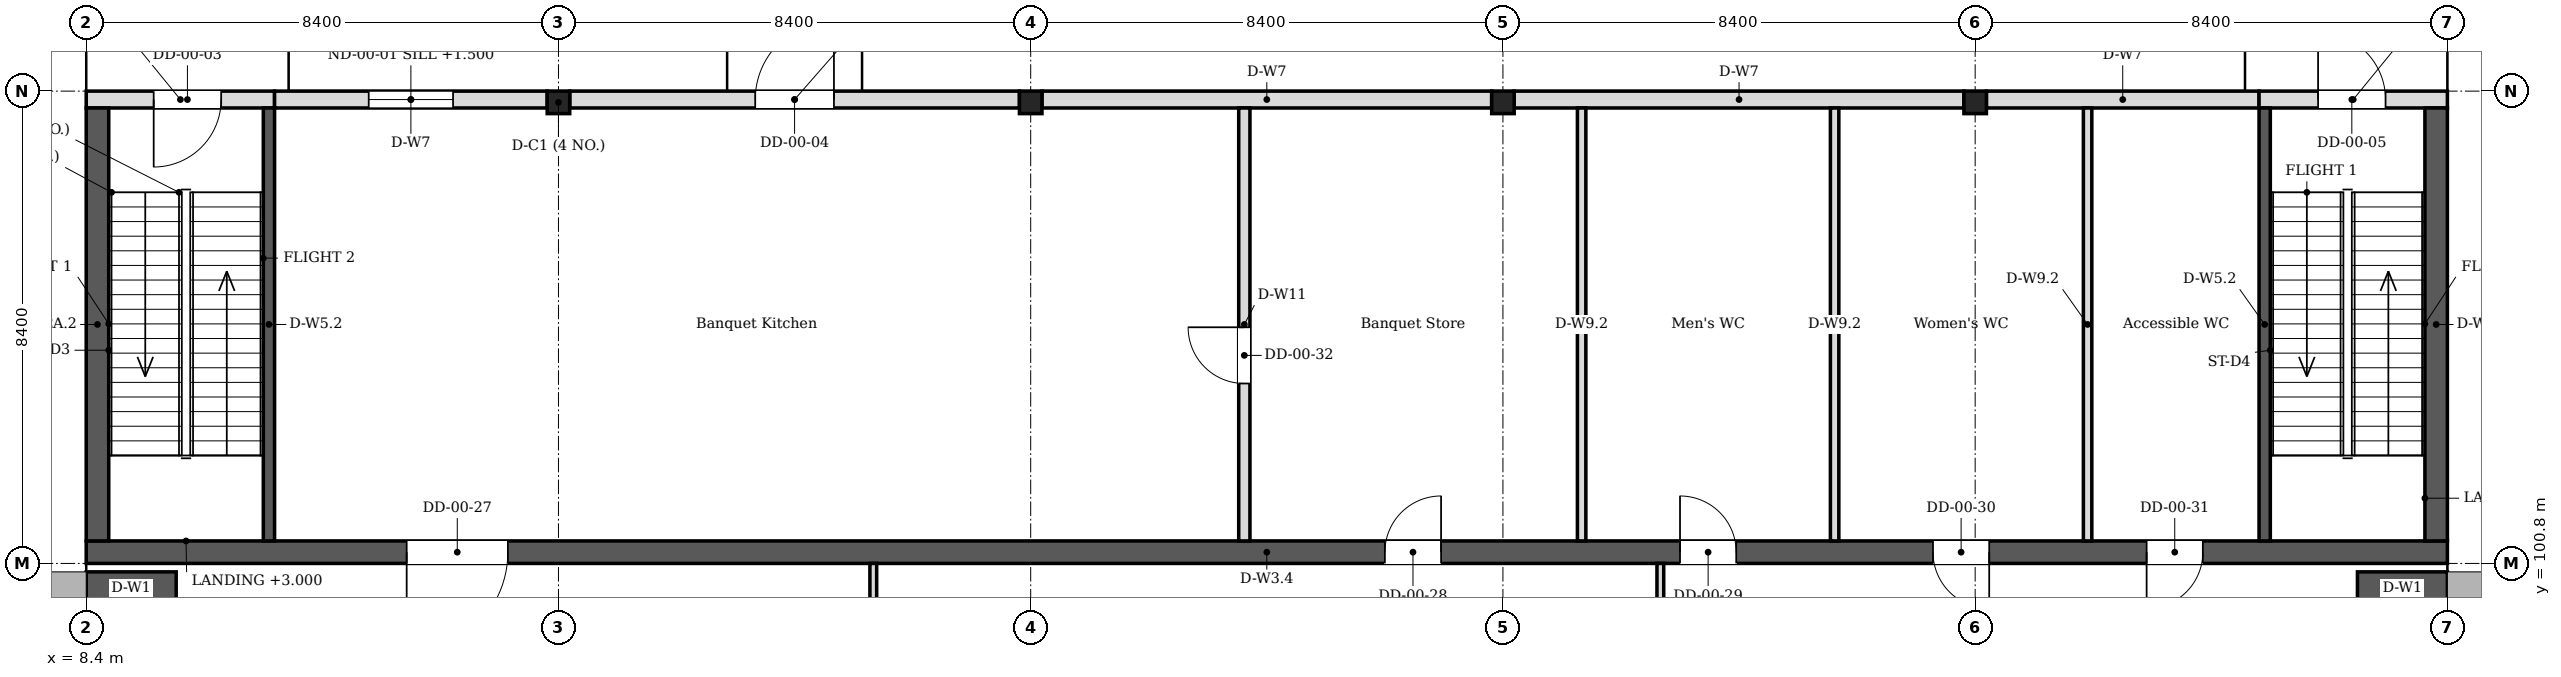
"""IFC4 building model, lengths in metres.
Left out: names, types, materials, properties, quantities, classifications, styles, units other than length and angle.
Written with IfcOpenShell. Run it as: python <this file> out.ifc"""

import sys

from ifc_helpers import new_model, si_unit, direction, frame, frame_2d, origin, origin_2d, place, context, subcontext, project, spatial, rectangle, i_section, extrude, element, fill, save


model = new_model("IFC4")
c1 = context("Model", 3, precision=1e-05, world=origin(), true_north=direction((0.0, 1.0)))
c2 = subcontext(c1, "Body", "Model", "MODEL_VIEW")
j1 = project(units=[si_unit("LENGTHUNIT", "METRE"), si_unit("PLANEANGLEUNIT", "RADIAN")], contexts=[c1])
p1 = place(None, origin())
s1 = spatial("IfcSite", under=j1, at=p1, CompositionType="ELEMENT")
p2 = place(p1, origin())
s2 = spatial("IfcBuilding", under=s1, at=p2, CompositionType="ELEMENT")
p3 = place(p2, origin())
s3 = spatial("IfcBuildingStorey", under=s2, at=p3, CompositionType="ELEMENT", Elevation=0.0)
p4 = place(p3, frame((8.4, 100.35, 0.0), z_axis=(0.0, 0.0, 1.0), x_axis=(1.0, 0.0, 0.0)))
e1 = element("IfcWall", 1, at=p4, inside=s3, PredefinedType="SOLIDWALL", context=c2, shape_type="SweptSolid", body=[
    extrude(rectangle(XDim=1.6, YDim=0.6, at=frame_2d((0.8, 0.0))), origin(), (0.0, 0.0, 1.0), 14.467),
])
p5 = place(p3, frame((50.4, 100.35, 0.0), z_axis=(0.0, 0.0, 1.0), x_axis=(-1.0, 0.0, 0.0)))
e2 = element("IfcWall", 2, at=p5, inside=s3, PredefinedType="SOLIDWALL", context=c2, shape_type="SweptSolid", body=[
    extrude(rectangle(XDim=1.6, YDim=0.6, at=frame_2d((0.8, 0.0))), origin(), (0.0, 0.0, 1.0), 14.467),
])
p6 = place(p3, frame((8.4, 101.0, 0.0), z_axis=(0.0, 0.0, 1.0), x_axis=(1.0, 0.0, 0.0)))
e3 = element("IfcWall", 3, at=p6, inside=s3, PredefinedType="SOLIDWALL", context=c2, shape_type="SweptSolid", body=[
    extrude(rectangle(XDim=42.0, YDim=0.4, at=frame_2d((21.0, 0.0))), origin(), (0.0, 0.0, 1.0), 5.72),
])
p7 = place(p6, frame((5.7, 0.0, 0.0)))
e4 = element("IfcOpeningElement", 4, at=p7, cuts=e3, PredefinedType="OPENING", context=c2, shape_type="SweptSolid", body=[
    extrude(rectangle(XDim=1.8, YDim=2.1, at=frame_2d((0.9, 1.05))), frame((0.0, 0.21, 0.0), z_axis=(0.0, -1.0, 0.0), x_axis=(1.0, 0.0, 0.0)), (0.0, 0.0, 1.0), 0.42),
])
p8 = place(p6, frame((23.1, 0.0, 0.0)))
e5 = element("IfcOpeningElement", 5, at=p8, cuts=e3, PredefinedType="OPENING", context=c2, shape_type="SweptSolid", body=[
    extrude(rectangle(XDim=1.0, YDim=2.1, at=frame_2d((0.5, 1.05))), frame((0.0, 0.21, 0.0), z_axis=(0.0, -1.0, 0.0), x_axis=(1.0, 0.0, 0.0)), (0.0, 0.0, 1.0), 0.42),
])
p9 = place(p6, frame((28.35, 0.0, 0.0)))
e6 = element("IfcOpeningElement", 6, at=p9, cuts=e3, PredefinedType="OPENING", context=c2, shape_type="SweptSolid", body=[
    extrude(rectangle(XDim=1.0, YDim=2.1, at=frame_2d((0.5, 1.05))), frame((0.0, 0.21, 0.0), z_axis=(0.0, -1.0, 0.0), x_axis=(1.0, 0.0, 0.0)), (0.0, 0.0, 1.0), 0.42),
])
p10 = place(p6, frame((32.85, 0.0, 0.0)))
e7 = element("IfcOpeningElement", 7, at=p10, cuts=e3, PredefinedType="OPENING", context=c2, shape_type="SweptSolid", body=[
    extrude(rectangle(XDim=1.0, YDim=2.1, at=frame_2d((0.5, 1.05))), frame((0.0, 0.21, 0.0), z_axis=(0.0, -1.0, 0.0), x_axis=(1.0, 0.0, 0.0)), (0.0, 0.0, 1.0), 0.42),
])
p11 = place(p6, frame((36.65, 0.0, 0.0)))
e8 = element("IfcOpeningElement", 8, at=p11, cuts=e3, PredefinedType="OPENING", context=c2, shape_type="SweptSolid", body=[
    extrude(rectangle(XDim=1.0, YDim=2.1, at=frame_2d((0.5, 1.05))), frame((0.0, 0.21, 0.0), z_axis=(0.0, -1.0, 0.0), x_axis=(1.0, 0.0, 0.0)), (0.0, 0.0, 1.0), 0.42),
])
p12 = place(p3, frame((8.6, 101.2, 0.0), z_axis=(0.0, 0.0, 1.0), x_axis=(0.0, 1.0, 0.0)))
e9 = element("IfcWall", 9, at=p12, inside=s3, PredefinedType="SOLIDWALL", context=c2, shape_type="SweptSolid", body=[
    extrude(rectangle(XDim=7.7, YDim=0.4, at=frame_2d((3.85, 0.0))), origin(), (0.0, 0.0, 1.0), 5.72),
])
p13 = place(p3, frame((11.65, 101.2, 0.0), z_axis=(0.0, 0.0, 1.0), x_axis=(0.0, 1.0, 0.0)))
e10 = element("IfcWall", 10, at=p13, inside=s3, PredefinedType="SOLIDWALL", context=c2, shape_type="SweptSolid", body=[
    extrude(rectangle(XDim=7.7, YDim=0.2, at=frame_2d((3.85, 0.0))), origin(), (0.0, 0.0, 1.0), 5.72),
])
p14 = place(p3, frame((50.2, 101.2, 0.0), z_axis=(0.0, 0.0, 1.0), x_axis=(0.0, 1.0, 0.0)))
e11 = element("IfcWall", 11, at=p14, inside=s3, PredefinedType="SOLIDWALL", context=c2, shape_type="SweptSolid", body=[
    extrude(rectangle(XDim=7.7, YDim=0.4, at=frame_2d((3.85, 0.0))), origin(), (0.0, 0.0, 1.0), 5.72),
])
p15 = place(p3, frame((47.15, 101.2, 0.0), z_axis=(0.0, 0.0, 1.0), x_axis=(0.0, 1.0, 0.0)))
e12 = element("IfcWall", 12, at=p15, inside=s3, PredefinedType="SOLIDWALL", context=c2, shape_type="SweptSolid", body=[
    extrude(rectangle(XDim=7.7, YDim=0.2, at=frame_2d((3.85, 0.0))), origin(), (0.0, 0.0, 1.0), 5.72),
])
for number, where, z_axis, x_axis in (
    (13, (16.8, 109.0, 0.0), (0.0, 0.0, 1.0), (1.0, 0.0, 0.0)),
    (14, (25.2, 109.0, 0.0), (0.0, 0.0, 1.0), (1.0, 0.0, 0.0)),
    (15, (33.6, 109.0, 0.0), (0.0, 0.0, 1.0), (1.0, 0.0, 0.0)),
    (16, (42.0, 109.0, 0.0), (0.0, 0.0, 1.0), (1.0, 0.0, 0.0)),
):
    element("IfcColumn", number, at=place(p3, frame(where, z_axis=z_axis, x_axis=x_axis)), inside=s3, PredefinedType="COLUMN", context=c2, shape_type="SweptSolid", body=[
        extrude(i_section(OverallWidth=0.4, OverallDepth=0.4, WebThickness=0.013, FlangeThickness=0.021, FilletRadius=0.022, at=origin_2d()), origin(), (0.0, 0.0, 1.0), 6.0),
    ])
p16 = place(p3, frame((8.4, 109.05, 0.0), z_axis=(0.0, 0.0, 1.0), x_axis=(1.0, 0.0, 0.0)))
e17 = element("IfcWall", 17, at=p16, inside=s3, PredefinedType="SOLIDWALL", context=c2, shape_type="SweptSolid", body=[
    extrude(rectangle(XDim=3.35, YDim=0.3, at=frame_2d((1.675, 0.0))), origin(), (0.0, 0.0, 1.0), 5.72),
])
p17 = place(p16, frame((1.2, 0.0, 0.0)))
e18 = element("IfcOpeningElement", 18, at=p17, cuts=e17, PredefinedType="OPENING", context=c2, shape_type="SweptSolid", body=[
    extrude(rectangle(XDim=1.2, YDim=2.1, at=frame_2d((0.6, 1.05))), frame((0.0, 0.16, 0.0), z_axis=(0.0, -1.0, 0.0), x_axis=(1.0, 0.0, 0.0)), (0.0, 0.0, 1.0), 0.32),
])
p18 = place(p3, frame((11.75, 109.05, 0.0), z_axis=(0.0, 0.0, 1.0), x_axis=(1.0, 0.0, 0.0)))
e19 = element("IfcWall", 19, at=p18, inside=s3, PredefinedType="SOLIDWALL", context=c2, shape_type="SweptSolid", body=[
    extrude(rectangle(XDim=4.85, YDim=0.3, at=frame_2d((2.425, 0.0))), origin(), (0.0, 0.0, 1.0), 5.22),
])
p19 = place(p18, frame((1.675, 0.0, 1.5)))
e20 = element("IfcOpeningElement", 20, at=p19, cuts=e19, PredefinedType="OPENING", context=c2, shape_type="SweptSolid", body=[
    extrude(rectangle(XDim=1.5, YDim=1.2, at=frame_2d((0.75, 0.6))), frame((0.0, 0.16, 0.0), z_axis=(0.0, -1.0, 0.0), x_axis=(1.0, 0.0, 0.0)), (0.0, 0.0, 1.0), 0.32),
])
p20 = place(p3, frame((17.0, 109.05, 0.0), z_axis=(0.0, 0.0, 1.0), x_axis=(1.0, 0.0, 0.0)))
e21 = element("IfcWall", 21, at=p20, inside=s3, PredefinedType="SOLIDWALL", context=c2, shape_type="SweptSolid", body=[
    extrude(rectangle(XDim=8.0, YDim=0.3, at=frame_2d((4.0, 0.0))), origin(), (0.0, 0.0, 1.0), 5.22),
])
p21 = place(p20, frame((3.3, 0.0, 0.0)))
e22 = element("IfcOpeningElement", 22, at=p21, cuts=e21, PredefinedType="OPENING", context=c2, shape_type="SweptSolid", body=[
    extrude(rectangle(XDim=1.4, YDim=2.1, at=frame_2d((0.7, 1.05))), frame((0.0, 0.16, 0.0), z_axis=(0.0, -1.0, 0.0), x_axis=(1.0, 0.0, 0.0)), (0.0, 0.0, 1.0), 0.32),
])
for number, where, z_axis, x_axis in (
    (23, (25.4, 109.05, 0.0), (0.0, 0.0, 1.0), (1.0, 0.0, 0.0)),
    (24, (33.8, 109.05, 0.0), (0.0, 0.0, 1.0), (1.0, 0.0, 0.0)),
):
    element("IfcWall", number, at=place(p3, frame(where, z_axis=z_axis, x_axis=x_axis)), inside=s3, PredefinedType="SOLIDWALL", context=c2, shape_type="SweptSolid", body=[
        extrude(rectangle(XDim=8.0, YDim=0.3, at=frame_2d((4.0, 0.0))), origin(), (0.0, 0.0, 1.0), 5.22),
    ])
p22 = place(p3, frame((42.2, 109.05, 0.0), z_axis=(0.0, 0.0, 1.0), x_axis=(1.0, 0.0, 0.0)))
e25 = element("IfcWall", 25, at=p22, inside=s3, PredefinedType="SOLIDWALL", context=c2, shape_type="SweptSolid", body=[
    extrude(rectangle(XDim=4.85, YDim=0.3, at=frame_2d((2.425, 0.0))), origin(), (0.0, 0.0, 1.0), 5.22),
])
p23 = place(p3, frame((47.05, 109.05, 0.0), z_axis=(0.0, 0.0, 1.0), x_axis=(1.0, 0.0, 0.0)))
e26 = element("IfcWall", 26, at=p23, inside=s3, PredefinedType="SOLIDWALL", context=c2, shape_type="SweptSolid", body=[
    extrude(rectangle(XDim=3.35, YDim=0.3, at=frame_2d((1.675, 0.0))), origin(), (0.0, 0.0, 1.0), 5.72),
])
p24 = place(p23, frame((1.05, 0.0, 0.0)))
e27 = element("IfcOpeningElement", 27, at=p24, cuts=e26, PredefinedType="OPENING", context=c2, shape_type="SweptSolid", body=[
    extrude(rectangle(XDim=1.2, YDim=2.1, at=frame_2d((0.6, 1.05))), frame((0.0, 0.16, 0.0), z_axis=(0.0, -1.0, 0.0), x_axis=(1.0, 0.0, 0.0)), (0.0, 0.0, 1.0), 0.32),
])
for number, where, z_axis, x_axis in (
    (28, (22.4, 67.2, 0.0), (0.0, 0.0, 1.0), (0.0, 1.0, 0.0)),
    (29, (36.4, 67.2, 0.0), (0.0, 0.0, 1.0), (0.0, 1.0, 0.0)),
):
    element("IfcWall", number, at=place(p3, frame(where, z_axis=z_axis, x_axis=x_axis)), inside=s3, PredefinedType="MOVABLE", context=c2, shape_type="SweptSolid", body=[
        extrude(rectangle(XDim=33.6, YDim=0.12, at=frame_2d((16.8, 0.0))), origin(), (0.0, 0.0, 1.0), 14.467),
    ])
p25 = place(p3, frame((29.0, 101.2, 0.0), z_axis=(0.0, 0.0, 1.0), x_axis=(0.0, 1.0, 0.0)))
e30 = element("IfcWall", 30, at=p25, inside=s3, PredefinedType="PARTITIONING", context=c2, shape_type="SweptSolid", body=[
    extrude(rectangle(XDim=7.7, YDim=0.2, at=frame_2d((3.85, 0.0))), origin(), (0.0, 0.0, 1.0), 5.72),
])
p26 = place(p25, frame((2.8, 0.0, 0.0)))
e31 = element("IfcOpeningElement", 31, at=p26, cuts=e30, PredefinedType="OPENING", context=c2, shape_type="SweptSolid", body=[
    extrude(rectangle(XDim=1.0, YDim=2.1, at=frame_2d((0.5, 1.05))), frame((0.0, 0.11, 0.0), z_axis=(0.0, -1.0, 0.0), x_axis=(1.0, 0.0, 0.0)), (0.0, 0.0, 1.0), 0.22),
])
for number, where, z_axis, x_axis in (
    (32, (35.0, 101.2, 0.0), (0.0, 0.0, 1.0), (0.0, 1.0, 0.0)),
    (33, (39.5, 101.2, 0.0), (0.0, 0.0, 1.0), (0.0, 1.0, 0.0)),
    (34, (44.0, 101.2, 0.0), (0.0, 0.0, 1.0), (0.0, 1.0, 0.0)),
):
    element("IfcWall", number, at=place(p3, frame(where, z_axis=z_axis, x_axis=x_axis)), inside=s3, PredefinedType="PARTITIONING", context=c2, shape_type="SweptSolid", body=[
        extrude(rectangle(XDim=7.7, YDim=0.15, at=frame_2d((3.85, 0.0))), origin(), (0.0, 0.0, 1.0), 5.72),
    ])
p27 = place(p17, origin())
e35 = element("IfcDoor", 35, at=p27, inside=s3, OperationType="SINGLE_SWING_LEFT", PredefinedType="DOOR", context=c2, shape_type="SweptSolid", body=[
    extrude(rectangle(XDim=1.2, YDim=2.1, at=frame_2d((0.6, 1.05))), frame((0.0, 0.025, 0.0), z_axis=(0.0, -1.0, 0.0), x_axis=(1.0, 0.0, 0.0)), (0.0, 0.0, 1.0), 0.05),
])
fill(e18, e35)
p28 = place(p19, origin())
e36 = element("IfcWindow", 36, at=p28, inside=s3, PartitioningType="SINGLE_PANEL", PredefinedType="WINDOW", context=c2, shape_type="SweptSolid", body=[
    extrude(rectangle(XDim=1.5, YDim=1.2, at=frame_2d((0.75, 0.6))), frame((0.0, 0.03, 0.0), z_axis=(0.0, -1.0, 0.0), x_axis=(1.0, 0.0, 0.0)), (0.0, 0.0, 1.0), 0.06),
])
fill(e20, e36)
p29 = place(p21, origin())
e37 = element("IfcDoor", 37, at=p29, inside=s3, OperationType="DOUBLE_DOOR_SINGLE_SWING", PredefinedType="DOOR", context=c2, shape_type="SweptSolid", body=[
    extrude(rectangle(XDim=1.4, YDim=2.1, at=frame_2d((0.7, 1.05))), frame((0.0, 0.025, 0.0), z_axis=(0.0, -1.0, 0.0), x_axis=(1.0, 0.0, 0.0)), (0.0, 0.0, 1.0), 0.05),
])
fill(e22, e37)
p30 = place(p24, origin())
e38 = element("IfcDoor", 38, at=p30, inside=s3, OperationType="SINGLE_SWING_LEFT", PredefinedType="DOOR", context=c2, shape_type="SweptSolid", body=[
    extrude(rectangle(XDim=1.2, YDim=2.1, at=frame_2d((0.6, 1.05))), frame((0.0, 0.025, 0.0), z_axis=(0.0, -1.0, 0.0), x_axis=(1.0, 0.0, 0.0)), (0.0, 0.0, 1.0), 0.05),
])
fill(e27, e38)
p31 = place(p7, origin())
e39 = element("IfcDoor", 39, at=p31, inside=s3, OperationType="DOUBLE_DOOR_SINGLE_SWING", PredefinedType="DOOR", context=c2, shape_type="SweptSolid", body=[
    extrude(rectangle(XDim=1.8, YDim=2.1, at=frame_2d((0.9, 1.05))), frame((0.0, 0.025, 0.0), z_axis=(0.0, -1.0, 0.0), x_axis=(1.0, 0.0, 0.0)), (0.0, 0.0, 1.0), 0.05),
])
fill(e4, e39)
p32 = place(p8, origin())
e40 = element("IfcDoor", 40, at=p32, inside=s3, OperationType="SINGLE_SWING_LEFT", PredefinedType="DOOR", context=c2, shape_type="SweptSolid", body=[
    extrude(rectangle(XDim=1.0, YDim=2.1, at=frame_2d((0.5, 1.05))), frame((0.0, 0.025, 0.0), z_axis=(0.0, -1.0, 0.0), x_axis=(1.0, 0.0, 0.0)), (0.0, 0.0, 1.0), 0.05),
])
fill(e5, e40)
p33 = place(p9, origin())
e41 = element("IfcDoor", 41, at=p33, inside=s3, OperationType="SINGLE_SWING_LEFT", PredefinedType="DOOR", context=c2, shape_type="SweptSolid", body=[
    extrude(rectangle(XDim=1.0, YDim=2.1, at=frame_2d((0.5, 1.05))), frame((0.0, 0.025, 0.0), z_axis=(0.0, -1.0, 0.0), x_axis=(1.0, 0.0, 0.0)), (0.0, 0.0, 1.0), 0.05),
])
fill(e6, e41)
p34 = place(p10, origin())
e42 = element("IfcDoor", 42, at=p34, inside=s3, OperationType="SINGLE_SWING_LEFT", PredefinedType="DOOR", context=c2, shape_type="SweptSolid", body=[
    extrude(rectangle(XDim=1.0, YDim=2.1, at=frame_2d((0.5, 1.05))), frame((0.0, 0.025, 0.0), z_axis=(0.0, -1.0, 0.0), x_axis=(1.0, 0.0, 0.0)), (0.0, 0.0, 1.0), 0.05),
])
fill(e7, e42)
p35 = place(p11, origin())
e43 = element("IfcDoor", 43, at=p35, inside=s3, OperationType="SINGLE_SWING_LEFT", PredefinedType="DOOR", context=c2, shape_type="SweptSolid", body=[
    extrude(rectangle(XDim=1.0, YDim=2.1, at=frame_2d((0.5, 1.05))), frame((0.0, 0.025, 0.0), z_axis=(0.0, -1.0, 0.0), x_axis=(1.0, 0.0, 0.0)), (0.0, 0.0, 1.0), 0.05),
])
fill(e8, e43)
p36 = place(p26, origin())
e44 = element("IfcDoor", 44, at=p36, inside=s3, OperationType="SINGLE_SWING_LEFT", PredefinedType="DOOR", context=c2, shape_type="SweptSolid", body=[
    extrude(rectangle(XDim=1.0, YDim=2.1, at=frame_2d((0.5, 1.05))), frame((0.0, 0.025, 0.0), z_axis=(0.0, -1.0, 0.0), x_axis=(1.0, 0.0, 0.0)), (0.0, 0.0, 1.0), 0.05),
])
fill(e31, e44)
save(model, sys.argv[1])
